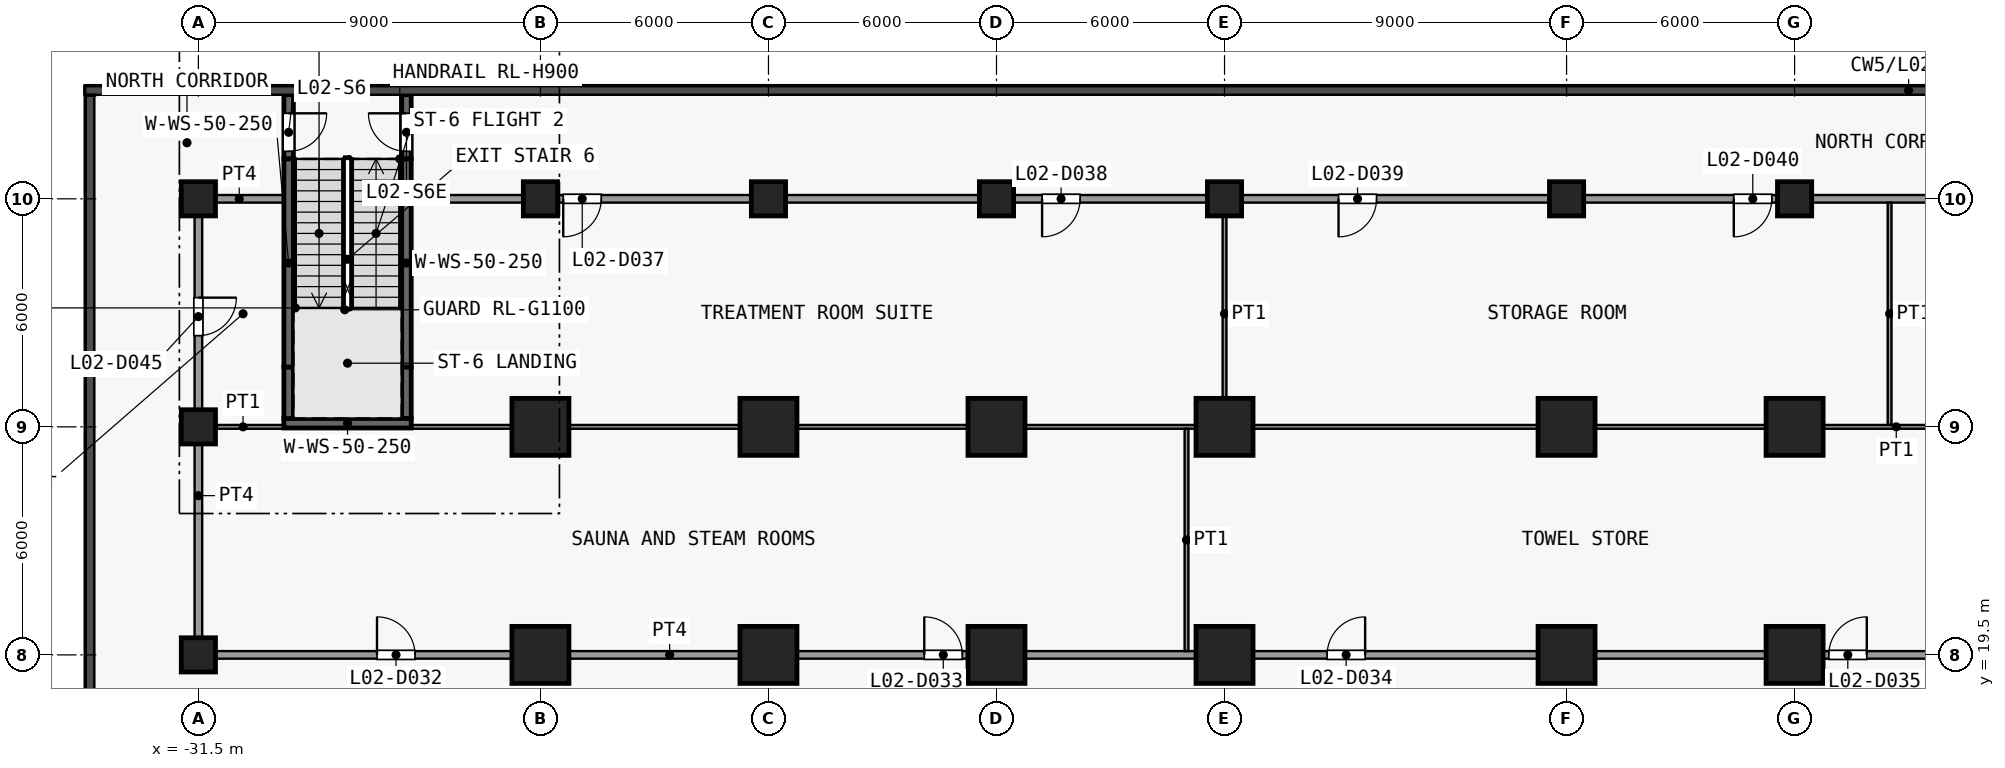
"""IFC4 building model, lengths in metres.
Left out: names, types, materials, properties, quantities, classifications, styles, units other than length and angle.
Written with IfcOpenShell. Run it as: python <this file> out.ifc"""

import sys

from ifc_helpers import new_model, si_unit, direction, frame, frame_2d, origin, origin_2d, place, context, subcontext, project, spatial, rectangle, extrude, element, fill, save


model = new_model("IFC4")
c1 = context("Model", 3, precision=1e-05, world=origin(), true_north=direction((0.0, 1.0)))
c2 = subcontext(c1, "Body", "Model", "MODEL_VIEW")
j1 = project(units=[si_unit("LENGTHUNIT", "METRE"), si_unit("PLANEANGLEUNIT", "RADIAN")], contexts=[c1])
p1 = place(None, origin())
s1 = spatial("IfcSite", under=j1, at=p1, CompositionType="ELEMENT")
p2 = place(p1, origin())
s2 = spatial("IfcBuilding", under=s1, at=p2, CompositionType="ELEMENT")
p3 = place(p2, frame((0.0, 0.0, 13.5)))
s3 = spatial("IfcBuildingStorey", under=s2, at=p3, CompositionType="ELEMENT", Elevation=13.5)
for number, where, z_axis, x_axis in (
    (1, (-31.5, 19.5, 0.0), (0.0, 0.0, 1.0), (1.0, 0.0, 0.0)),
    (2, (-31.5, 25.5, 0.0), (0.0, 0.0, 1.0), (1.0, 0.0, 0.0)),
    (3, (-31.5, 31.5, 0.0), (0.0, 0.0, 1.0), (1.0, 0.0, 0.0)),
):
    element("IfcColumn", number, at=place(p3, frame(where, z_axis=z_axis, x_axis=x_axis)), inside=s3, PredefinedType="COLUMN", context=c2, shape_type="SweptSolid", body=[
        extrude(rectangle(XDim=0.9, YDim=0.9, at=origin_2d()), origin(), (0.0, 0.0, 1.0), 5.0),
    ])
for number, where, z_axis, x_axis in (
    (4, (-22.5, 19.5, 0.0), (0.0, 0.0, 1.0), (1.0, 0.0, 0.0)),
    (5, (-22.5, 25.5, 0.0), (0.0, 0.0, 1.0), (1.0, 0.0, 0.0)),
):
    element("IfcColumn", number, at=place(p3, frame(where, z_axis=z_axis, x_axis=x_axis)), inside=s3, PredefinedType="COLUMN", context=c2, shape_type="SweptSolid", body=[
        extrude(rectangle(XDim=1.5, YDim=1.5, at=origin_2d()), origin(), (0.0, 0.0, 1.0), 5.0),
    ])
p4 = place(p3, frame((-22.5, 31.5, 0.0), z_axis=(0.0, 0.0, 1.0), x_axis=(1.0, 0.0, 0.0)))
e6 = element("IfcColumn", 6, at=p4, inside=s3, PredefinedType="COLUMN", context=c2, shape_type="SweptSolid", body=[
    extrude(rectangle(XDim=0.9, YDim=0.9, at=origin_2d()), origin(), (0.0, 0.0, 1.0), 5.0),
])
for number, where, z_axis, x_axis in (
    (7, (-16.5, 19.5, 0.0), (0.0, 0.0, 1.0), (1.0, 0.0, 0.0)),
    (8, (-16.5, 25.5, 0.0), (0.0, 0.0, 1.0), (1.0, 0.0, 0.0)),
):
    element("IfcColumn", number, at=place(p3, frame(where, z_axis=z_axis, x_axis=x_axis)), inside=s3, PredefinedType="COLUMN", context=c2, shape_type="SweptSolid", body=[
        extrude(rectangle(XDim=1.5, YDim=1.5, at=origin_2d()), origin(), (0.0, 0.0, 1.0), 5.0),
    ])
p5 = place(p3, frame((-16.5, 31.5, 0.0), z_axis=(0.0, 0.0, 1.0), x_axis=(1.0, 0.0, 0.0)))
e9 = element("IfcColumn", 9, at=p5, inside=s3, PredefinedType="COLUMN", context=c2, shape_type="SweptSolid", body=[
    extrude(rectangle(XDim=0.9, YDim=0.9, at=origin_2d()), origin(), (0.0, 0.0, 1.0), 5.0),
])
for number, where, z_axis, x_axis in (
    (10, (-10.5, 19.5, 0.0), (0.0, 0.0, 1.0), (1.0, 0.0, 0.0)),
    (11, (-10.5, 25.5, 0.0), (0.0, 0.0, 1.0), (1.0, 0.0, 0.0)),
):
    element("IfcColumn", number, at=place(p3, frame(where, z_axis=z_axis, x_axis=x_axis)), inside=s3, PredefinedType="COLUMN", context=c2, shape_type="SweptSolid", body=[
        extrude(rectangle(XDim=1.5, YDim=1.5, at=origin_2d()), origin(), (0.0, 0.0, 1.0), 5.0),
    ])
p6 = place(p3, frame((-10.5, 31.5, 0.0), z_axis=(0.0, 0.0, 1.0), x_axis=(1.0, 0.0, 0.0)))
e12 = element("IfcColumn", 12, at=p6, inside=s3, PredefinedType="COLUMN", context=c2, shape_type="SweptSolid", body=[
    extrude(rectangle(XDim=0.9, YDim=0.9, at=origin_2d()), origin(), (0.0, 0.0, 1.0), 5.0),
])
for number, where, z_axis, x_axis in (
    (13, (-4.5, 19.5, 0.0), (0.0, 0.0, 1.0), (1.0, 0.0, 0.0)),
    (14, (-4.5, 25.5, 0.0), (0.0, 0.0, 1.0), (1.0, 0.0, 0.0)),
):
    element("IfcColumn", number, at=place(p3, frame(where, z_axis=z_axis, x_axis=x_axis)), inside=s3, PredefinedType="COLUMN", context=c2, shape_type="SweptSolid", body=[
        extrude(rectangle(XDim=1.5, YDim=1.5, at=origin_2d()), origin(), (0.0, 0.0, 1.0), 5.0),
    ])
p7 = place(p3, frame((-4.5, 31.5, 0.0), z_axis=(0.0, 0.0, 1.0), x_axis=(1.0, 0.0, 0.0)))
e15 = element("IfcColumn", 15, at=p7, inside=s3, PredefinedType="COLUMN", context=c2, shape_type="SweptSolid", body=[
    extrude(rectangle(XDim=0.9, YDim=0.9, at=origin_2d()), origin(), (0.0, 0.0, 1.0), 5.0),
])
for number, where, z_axis, x_axis in (
    (16, (4.5, 19.5, 0.0), (0.0, 0.0, 1.0), (1.0, 0.0, 0.0)),
    (17, (4.5, 25.5, 0.0), (0.0, 0.0, 1.0), (1.0, 0.0, 0.0)),
):
    element("IfcColumn", number, at=place(p3, frame(where, z_axis=z_axis, x_axis=x_axis)), inside=s3, PredefinedType="COLUMN", context=c2, shape_type="SweptSolid", body=[
        extrude(rectangle(XDim=1.5, YDim=1.5, at=origin_2d()), origin(), (0.0, 0.0, 1.0), 5.0),
    ])
p8 = place(p3, frame((4.5, 31.5, 0.0), z_axis=(0.0, 0.0, 1.0), x_axis=(1.0, 0.0, 0.0)))
e18 = element("IfcColumn", 18, at=p8, inside=s3, PredefinedType="COLUMN", context=c2, shape_type="SweptSolid", body=[
    extrude(rectangle(XDim=0.9, YDim=0.9, at=origin_2d()), origin(), (0.0, 0.0, 1.0), 5.0),
])
for number, where, z_axis, x_axis in (
    (19, (10.5, 19.5, 0.0), (0.0, 0.0, 1.0), (1.0, 0.0, 0.0)),
    (20, (10.5, 25.5, 0.0), (0.0, 0.0, 1.0), (1.0, 0.0, 0.0)),
):
    element("IfcColumn", number, at=place(p3, frame(where, z_axis=z_axis, x_axis=x_axis)), inside=s3, PredefinedType="COLUMN", context=c2, shape_type="SweptSolid", body=[
        extrude(rectangle(XDim=1.5, YDim=1.5, at=origin_2d()), origin(), (0.0, 0.0, 1.0), 5.0),
    ])
p9 = place(p3, frame((10.5, 31.5, 0.0), z_axis=(0.0, 0.0, 1.0), x_axis=(1.0, 0.0, 0.0)))
e21 = element("IfcColumn", 21, at=p9, inside=s3, PredefinedType="COLUMN", context=c2, shape_type="SweptSolid", body=[
    extrude(rectangle(XDim=0.9, YDim=0.9, at=origin_2d()), origin(), (0.0, 0.0, 1.0), 5.0),
])
p10 = place(p3, frame((-29.125, 34.24, 0.0), z_axis=(0.0, 0.0, 1.0), x_axis=(0.0, -1.0, 0.0)))
e22 = element("IfcWall", 22, at=p10, inside=s3, PredefinedType="SHEAR", context=c2, shape_type="SweptSolid", body=[
    extrude(rectangle(XDim=1.69, YDim=0.25, at=frame_2d((0.845, 0.0))), origin(), (0.0, 0.0, 1.0), 4.65),
])
p11 = place(p10, frame((0.49, 0.0, 0.0)))
e23 = element("IfcOpeningElement", 23, at=p11, cuts=e22, PredefinedType="OPENING", context=c2, shape_type="SweptSolid", body=[
    extrude(rectangle(XDim=1.0, YDim=2.1, at=frame_2d((0.5, 1.05))), frame((0.0, 0.135, 0.0), z_axis=(0.0, -1.0, 0.0), x_axis=(1.0, 0.0, 0.0)), (0.0, 0.0, 1.0), 0.27),
])
p12 = place(p3, frame((-29.125, 27.07, 0.0), z_axis=(0.0, 0.0, 1.0), x_axis=(0.0, 1.0, 0.0)))
e24 = element("IfcWall", 24, at=p12, inside=s3, PredefinedType="SHEAR", context=c2, shape_type="SweptSolid", body=[
    extrude(rectangle(XDim=5.48, YDim=0.25, at=frame_2d((2.74, 0.0))), origin(), (0.0, 0.0, 1.0), 4.65),
])
p13 = place(p3, frame((-29.125, 25.72, 0.0), z_axis=(0.0, 0.0, 1.0), x_axis=(0.0, 1.0, 0.0)))
e25 = element("IfcWall", 25, at=p13, inside=s3, PredefinedType="SHEAR", context=c2, shape_type="SweptSolid", body=[
    extrude(rectangle(XDim=1.35, YDim=0.25, at=frame_2d((0.675, 0.0))), origin(), (0.0, 0.0, 1.0), 4.65),
])
p14 = place(p3, frame((-26.025, 32.55, 0.0), z_axis=(0.0, 0.0, 1.0), x_axis=(0.0, 1.0, 0.0)))
e26 = element("IfcWall", 26, at=p14, inside=s3, PredefinedType="SHEAR", context=c2, shape_type="SweptSolid", body=[
    extrude(rectangle(XDim=1.69, YDim=0.25, at=frame_2d((0.845, 0.0))), origin(), (0.0, 0.0, 1.0), 4.65),
])
p15 = place(p14, frame((0.2, 0.0, 0.0)))
e27 = element("IfcOpeningElement", 27, at=p15, cuts=e26, PredefinedType="OPENING", context=c2, shape_type="SweptSolid", body=[
    extrude(rectangle(XDim=1.0, YDim=2.1, at=frame_2d((0.5, 1.05))), frame((0.0, 0.135, 0.0), z_axis=(0.0, -1.0, 0.0), x_axis=(1.0, 0.0, 0.0)), (0.0, 0.0, 1.0), 0.27),
])
p16 = place(p3, frame((-26.025, 27.07, 0.0), z_axis=(0.0, 0.0, 1.0), x_axis=(0.0, 1.0, 0.0)))
e28 = element("IfcWall", 28, at=p16, inside=s3, PredefinedType="SHEAR", context=c2, shape_type="SweptSolid", body=[
    extrude(rectangle(XDim=5.48, YDim=0.25, at=frame_2d((2.74, 0.0))), origin(), (0.0, 0.0, 1.0), 4.65),
])
p17 = place(p3, frame((-26.025, 25.72, 0.0), z_axis=(0.0, 0.0, 1.0), x_axis=(0.0, 1.0, 0.0)))
e29 = element("IfcWall", 29, at=p17, inside=s3, PredefinedType="SHEAR", context=c2, shape_type="SweptSolid", body=[
    extrude(rectangle(XDim=1.35, YDim=0.25, at=frame_2d((0.675, 0.0))), origin(), (0.0, 0.0, 1.0), 4.65),
])
p18 = place(p3, frame((-29.25, 25.595, 0.0), z_axis=(0.0, 0.0, 1.0), x_axis=(1.0, 0.0, 0.0)))
e30 = element("IfcWall", 30, at=p18, inside=s3, PredefinedType="SHEAR", context=c2, shape_type="SweptSolid", body=[
    extrude(rectangle(XDim=3.35, YDim=0.25, at=frame_2d((1.675, 0.0))), origin(), (0.0, 0.0, 1.0), 4.65),
])
p19 = place(p3, frame((-31.6, 19.5, 0.0), z_axis=(0.0, 0.0, 1.0), x_axis=(1.0, 0.0, 0.0)))
e31 = element("IfcWall", 31, at=p19, inside=s3, PredefinedType="PARTITIONING", context=c2, shape_type="SweptSolid", body=[
    extrude(rectangle(XDim=60.1, YDim=0.2, at=frame_2d((30.05, 0.0))), origin(), (0.0, 0.0, 1.0), 4.65),
])
p20 = place(p19, frame((4.8, 0.0, 0.0)))
e32 = element("IfcOpeningElement", 32, at=p20, cuts=e31, PredefinedType="OPENING", context=c2, shape_type="SweptSolid", body=[
    extrude(rectangle(XDim=1.0, YDim=2.1, at=frame_2d((0.5, 1.05))), frame((0.0, 0.11, 0.0), z_axis=(0.0, -1.0, 0.0), x_axis=(1.0, 0.0, 0.0)), (0.0, 0.0, 1.0), 0.22),
])
p21 = place(p19, frame((19.2, 0.0, 0.0)))
e33 = element("IfcOpeningElement", 33, at=p21, cuts=e31, PredefinedType="OPENING", context=c2, shape_type="SweptSolid", body=[
    extrude(rectangle(XDim=1.0, YDim=2.1, at=frame_2d((0.5, 1.05))), frame((0.0, 0.11, 0.0), z_axis=(0.0, -1.0, 0.0), x_axis=(1.0, 0.0, 0.0)), (0.0, 0.0, 1.0), 0.22),
])
p22 = place(p19, frame((29.8, 0.0, 0.0)))
e34 = element("IfcOpeningElement", 34, at=p22, cuts=e31, PredefinedType="OPENING", context=c2, shape_type="SweptSolid", body=[
    extrude(rectangle(XDim=1.0, YDim=2.1, at=frame_2d((0.5, 1.05))), frame((0.0, 0.11, 0.0), z_axis=(0.0, -1.0, 0.0), x_axis=(1.0, 0.0, 0.0)), (0.0, 0.0, 1.0), 0.22),
])
p23 = place(p19, frame((43.0, 0.0, 0.0)))
e35 = element("IfcOpeningElement", 35, at=p23, cuts=e31, PredefinedType="OPENING", context=c2, shape_type="SweptSolid", body=[
    extrude(rectangle(XDim=1.0, YDim=2.1, at=frame_2d((0.5, 1.05))), frame((0.0, 0.11, 0.0), z_axis=(0.0, -1.0, 0.0), x_axis=(1.0, 0.0, 0.0)), (0.0, 0.0, 1.0), 0.22),
])
p24 = place(p19, frame((52.1, 0.0, 0.0)))
e36 = element("IfcOpeningElement", 36, at=p24, cuts=e31, PredefinedType="OPENING", context=c2, shape_type="SweptSolid", body=[
    extrude(rectangle(XDim=1.0, YDim=2.1, at=frame_2d((0.5, 1.05))), frame((0.0, 0.11, 0.0), z_axis=(0.0, -1.0, 0.0), x_axis=(1.0, 0.0, 0.0)), (0.0, 0.0, 1.0), 0.22),
])
p25 = place(p3, frame((-31.4, 25.5, 0.0), z_axis=(0.0, 0.0, 1.0), x_axis=(1.0, 0.0, 0.0)))
e37 = element("IfcWall", 37, at=p25, inside=s3, PredefinedType="PARTITIONING", context=c2, shape_type="SweptSolid", body=[
    extrude(rectangle(XDim=2.15, YDim=0.1, at=frame_2d((1.075, 0.0))), origin(), (0.0, 0.0, 1.0), 4.65),
])
p26 = place(p3, frame((-25.9, 25.5, 0.0), z_axis=(0.0, 0.0, 1.0), x_axis=(1.0, 0.0, 0.0)))
e38 = element("IfcWall", 38, at=p26, inside=s3, PredefinedType="PARTITIONING", context=c2, shape_type="SweptSolid", body=[
    extrude(rectangle(XDim=78.15, YDim=0.1, at=frame_2d((39.075, 0.0))), origin(), (0.0, 0.0, 1.0), 4.65),
])
p27 = place(p3, frame((-31.6, 31.5, 0.0), z_axis=(0.0, 0.0, 1.0), x_axis=(1.0, 0.0, 0.0)))
e39 = element("IfcWall", 39, at=p27, inside=s3, PredefinedType="PARTITIONING", context=c2, shape_type="SweptSolid", body=[
    extrude(rectangle(XDim=2.35, YDim=0.2, at=frame_2d((1.175, 0.0))), origin(), (0.0, 0.0, 1.0), 4.65),
])
p28 = place(p3, frame((-25.9, 31.5, 0.0), z_axis=(0.0, 0.0, 1.0), x_axis=(1.0, 0.0, 0.0)))
e40 = element("IfcWall", 40, at=p28, inside=s3, PredefinedType="PARTITIONING", context=c2, shape_type="SweptSolid", body=[
    extrude(rectangle(XDim=78.15, YDim=0.2, at=frame_2d((39.075, 0.0))), origin(), (0.0, 0.0, 1.0), 4.65),
])
p29 = place(p28, frame((4.0, 0.0, 0.0)))
e41 = element("IfcOpeningElement", 41, at=p29, cuts=e40, PredefinedType="OPENING", context=c2, shape_type="SweptSolid", body=[
    extrude(rectangle(XDim=1.0, YDim=2.1, at=frame_2d((0.5, 1.05))), frame((0.0, 0.11, 0.0), z_axis=(0.0, -1.0, 0.0), x_axis=(1.0, 0.0, 0.0)), (0.0, 0.0, 1.0), 0.22),
])
p30 = place(p28, frame((16.6, 0.0, 0.0)))
e42 = element("IfcOpeningElement", 42, at=p30, cuts=e40, PredefinedType="OPENING", context=c2, shape_type="SweptSolid", body=[
    extrude(rectangle(XDim=1.0, YDim=2.1, at=frame_2d((0.5, 1.05))), frame((0.0, 0.11, 0.0), z_axis=(0.0, -1.0, 0.0), x_axis=(1.0, 0.0, 0.0)), (0.0, 0.0, 1.0), 0.22),
])
p31 = place(p28, frame((24.4, 0.0, 0.0)))
e43 = element("IfcOpeningElement", 43, at=p31, cuts=e40, PredefinedType="OPENING", context=c2, shape_type="SweptSolid", body=[
    extrude(rectangle(XDim=1.0, YDim=2.1, at=frame_2d((0.5, 1.05))), frame((0.0, 0.11, 0.0), z_axis=(0.0, -1.0, 0.0), x_axis=(1.0, 0.0, 0.0)), (0.0, 0.0, 1.0), 0.22),
])
p32 = place(p28, frame((34.8, 0.0, 0.0)))
e44 = element("IfcOpeningElement", 44, at=p32, cuts=e40, PredefinedType="OPENING", context=c2, shape_type="SweptSolid", body=[
    extrude(rectangle(XDim=1.0, YDim=2.1, at=frame_2d((0.5, 1.05))), frame((0.0, 0.11, 0.0), z_axis=(0.0, -1.0, 0.0), x_axis=(1.0, 0.0, 0.0)), (0.0, 0.0, 1.0), 0.22),
])
p33 = place(p28, frame((43.0, 0.0, 0.0)))
e45 = element("IfcOpeningElement", 45, at=p33, cuts=e40, PredefinedType="OPENING", context=c2, shape_type="SweptSolid", body=[
    extrude(rectangle(XDim=1.0, YDim=2.1, at=frame_2d((0.5, 1.05))), frame((0.0, 0.11, 0.0), z_axis=(0.0, -1.0, 0.0), x_axis=(1.0, 0.0, 0.0)), (0.0, 0.0, 1.0), 0.22),
])
p34 = place(p28, frame((55.8, 0.0, 0.0)))
e46 = element("IfcOpeningElement", 46, at=p34, cuts=e40, PredefinedType="OPENING", context=c2, shape_type="SweptSolid", body=[
    extrude(rectangle(XDim=1.0, YDim=2.1, at=frame_2d((0.5, 1.05))), frame((0.0, 0.11, 0.0), z_axis=(0.0, -1.0, 0.0), x_axis=(1.0, 0.0, 0.0)), (0.0, 0.0, 1.0), 0.22),
])
p35 = place(p28, frame((63.9, 0.0, 0.0)))
e47 = element("IfcOpeningElement", 47, at=p35, cuts=e40, PredefinedType="OPENING", context=c2, shape_type="SweptSolid", body=[
    extrude(rectangle(XDim=1.0, YDim=2.1, at=frame_2d((0.5, 1.05))), frame((0.0, 0.11, 0.0), z_axis=(0.0, -1.0, 0.0), x_axis=(1.0, 0.0, 0.0)), (0.0, 0.0, 1.0), 0.22),
])
p36 = place(p28, frame((73.8, 0.0, 0.0)))
e48 = element("IfcOpeningElement", 48, at=p36, cuts=e40, PredefinedType="OPENING", context=c2, shape_type="SweptSolid", body=[
    extrude(rectangle(XDim=1.0, YDim=2.1, at=frame_2d((0.5, 1.05))), frame((0.0, 0.11, 0.0), z_axis=(0.0, -1.0, 0.0), x_axis=(1.0, 0.0, 0.0)), (0.0, 0.0, 1.0), 0.22),
])
p37 = place(p3, frame((-31.5, 19.6, 0.0), z_axis=(0.0, 0.0, 1.0), x_axis=(0.0, 1.0, 0.0)))
e49 = element("IfcWall", 49, at=p37, inside=s3, PredefinedType="PARTITIONING", context=c2, shape_type="SweptSolid", body=[
    extrude(rectangle(XDim=11.8, YDim=0.2, at=frame_2d((5.9, 0.0))), origin(), (0.0, 0.0, 1.0), 4.65),
])
p38 = place(p37, frame((8.3, 0.0, 0.0)))
e50 = element("IfcOpeningElement", 50, at=p38, cuts=e49, PredefinedType="OPENING", context=c2, shape_type="SweptSolid", body=[
    extrude(rectangle(XDim=1.0, YDim=2.1, at=frame_2d((0.5, 1.05))), frame((0.0, 0.11, 0.0), z_axis=(0.0, -1.0, 0.0), x_axis=(1.0, 0.0, 0.0)), (0.0, 0.0, 1.0), 0.22),
])
for number, where, z_axis, x_axis in (
    (51, (-5.5, 19.6, 0.0), (0.0, 0.0, 1.0), (0.0, 1.0, 0.0)),
    (52, (-4.5, 25.55, 0.0), (0.0, 0.0, 1.0), (0.0, 1.0, 0.0)),
    (53, (13.0, 25.55, 0.0), (0.0, 0.0, 1.0), (0.0, 1.0, 0.0)),
):
    element("IfcWall", number, at=place(p3, frame(where, z_axis=z_axis, x_axis=x_axis)), inside=s3, PredefinedType="PARTITIONING", context=c2, shape_type="SweptSolid", body=[
        extrude(rectangle(XDim=5.85, YDim=0.1, at=frame_2d((2.925, 0.0))), origin(), (0.0, 0.0, 1.0), 4.65),
    ])
p39 = place(p11, origin())
e54 = element("IfcDoor", 54, at=p39, inside=s3, OperationType="SINGLE_SWING_LEFT", PredefinedType="DOOR", context=c2, shape_type="SweptSolid", body=[
    extrude(rectangle(XDim=1.0, YDim=2.1, at=frame_2d((0.5, 1.05))), frame((0.0, 0.025, 0.0), z_axis=(0.0, -1.0, 0.0), x_axis=(1.0, 0.0, 0.0)), (0.0, 0.0, 1.0), 0.05),
])
fill(e23, e54)
p40 = place(p15, origin())
e55 = element("IfcDoor", 55, at=p40, inside=s3, OperationType="SINGLE_SWING_RIGHT", PredefinedType="DOOR", context=c2, shape_type="SweptSolid", body=[
    extrude(rectangle(XDim=1.0, YDim=2.1, at=frame_2d((0.5, 1.05))), frame((0.0, 0.025, 0.0), z_axis=(0.0, -1.0, 0.0), x_axis=(1.0, 0.0, 0.0)), (0.0, 0.0, 1.0), 0.05),
])
fill(e27, e55)
p41 = place(p20, origin())
e56 = element("IfcDoor", 56, at=p41, inside=s3, OperationType="SINGLE_SWING_RIGHT", PredefinedType="DOOR", context=c2, shape_type="SweptSolid", body=[
    extrude(rectangle(XDim=1.0, YDim=2.1, at=frame_2d((0.5, 1.05))), frame((0.0, 0.025, 0.0), z_axis=(0.0, -1.0, 0.0), x_axis=(1.0, 0.0, 0.0)), (0.0, 0.0, 1.0), 0.05),
])
fill(e32, e56)
p42 = place(p21, origin())
e57 = element("IfcDoor", 57, at=p42, inside=s3, OperationType="SINGLE_SWING_RIGHT", PredefinedType="DOOR", context=c2, shape_type="SweptSolid", body=[
    extrude(rectangle(XDim=1.0, YDim=2.1, at=frame_2d((0.5, 1.05))), frame((0.0, 0.025, 0.0), z_axis=(0.0, -1.0, 0.0), x_axis=(1.0, 0.0, 0.0)), (0.0, 0.0, 1.0), 0.05),
])
fill(e33, e57)
p43 = place(p22, origin())
e58 = element("IfcDoor", 58, at=p43, inside=s3, OperationType="SINGLE_SWING_LEFT", PredefinedType="DOOR", context=c2, shape_type="SweptSolid", body=[
    extrude(rectangle(XDim=1.0, YDim=2.1, at=frame_2d((0.5, 1.05))), frame((0.0, 0.025, 0.0), z_axis=(0.0, -1.0, 0.0), x_axis=(1.0, 0.0, 0.0)), (0.0, 0.0, 1.0), 0.05),
])
fill(e34, e58)
p44 = place(p23, origin())
e59 = element("IfcDoor", 59, at=p44, inside=s3, OperationType="SINGLE_SWING_LEFT", PredefinedType="DOOR", context=c2, shape_type="SweptSolid", body=[
    extrude(rectangle(XDim=1.0, YDim=2.1, at=frame_2d((0.5, 1.05))), frame((0.0, 0.025, 0.0), z_axis=(0.0, -1.0, 0.0), x_axis=(1.0, 0.0, 0.0)), (0.0, 0.0, 1.0), 0.05),
])
fill(e35, e59)
p45 = place(p29, origin())
e60 = element("IfcDoor", 60, at=p45, inside=s3, OperationType="SINGLE_SWING_LEFT", PredefinedType="DOOR", context=c2, shape_type="SweptSolid", body=[
    extrude(rectangle(XDim=1.0, YDim=2.1, at=frame_2d((0.5, 1.05))), frame((0.0, 0.025, 0.0), z_axis=(0.0, -1.0, 0.0), x_axis=(1.0, 0.0, 0.0)), (0.0, 0.0, 1.0), 0.05),
])
fill(e41, e60)
p46 = place(p30, origin())
e61 = element("IfcDoor", 61, at=p46, inside=s3, OperationType="SINGLE_SWING_LEFT", PredefinedType="DOOR", context=c2, shape_type="SweptSolid", body=[
    extrude(rectangle(XDim=1.0, YDim=2.1, at=frame_2d((0.5, 1.05))), frame((0.0, 0.025, 0.0), z_axis=(0.0, -1.0, 0.0), x_axis=(1.0, 0.0, 0.0)), (0.0, 0.0, 1.0), 0.05),
])
fill(e42, e61)
p47 = place(p31, origin())
e62 = element("IfcDoor", 62, at=p47, inside=s3, OperationType="SINGLE_SWING_LEFT", PredefinedType="DOOR", context=c2, shape_type="SweptSolid", body=[
    extrude(rectangle(XDim=1.0, YDim=2.1, at=frame_2d((0.5, 1.05))), frame((0.0, 0.025, 0.0), z_axis=(0.0, -1.0, 0.0), x_axis=(1.0, 0.0, 0.0)), (0.0, 0.0, 1.0), 0.05),
])
fill(e43, e62)
p48 = place(p32, origin())
e63 = element("IfcDoor", 63, at=p48, inside=s3, OperationType="SINGLE_SWING_LEFT", PredefinedType="DOOR", context=c2, shape_type="SweptSolid", body=[
    extrude(rectangle(XDim=1.0, YDim=2.1, at=frame_2d((0.5, 1.05))), frame((0.0, 0.025, 0.0), z_axis=(0.0, -1.0, 0.0), x_axis=(1.0, 0.0, 0.0)), (0.0, 0.0, 1.0), 0.05),
])
fill(e44, e63)
p49 = place(p38, origin())
e64 = element("IfcDoor", 64, at=p49, inside=s3, OperationType="SINGLE_SWING_RIGHT", PredefinedType="DOOR", context=c2, shape_type="SweptSolid", body=[
    extrude(rectangle(XDim=1.0, YDim=2.1, at=frame_2d((0.5, 1.05))), frame((0.0, 0.025, 0.0), z_axis=(0.0, -1.0, 0.0), x_axis=(1.0, 0.0, 0.0)), (0.0, 0.0, 1.0), 0.05),
])
fill(e50, e64)
save(model, sys.argv[1])
